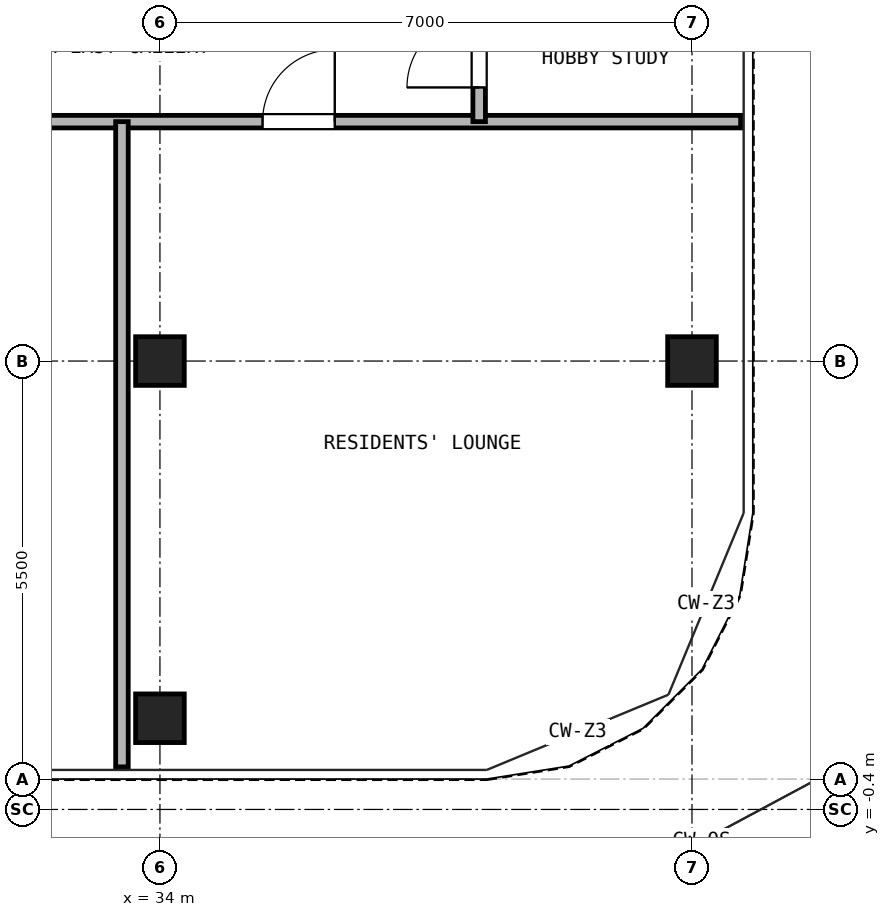
"""IFC4 building model, lengths in metres.
Left out: names, types, materials, properties, quantities, classifications, styles, units other than length and angle.
Written with IfcOpenShell. Run it as: python <this file> out.ifc"""

import sys

from ifc_helpers import new_model, si_unit, direction, frame, frame_2d, origin, origin_2d, place, context, subcontext, project, spatial, rectangle, hollow_rectangle, extrude, source, transform, mapped, element, fill, save


model = new_model("IFC4")
c1 = context("Model", 3, precision=1e-05, world=origin(), true_north=direction((0.0, 1.0)))
c2 = subcontext(c1, "Body", "Model", "MODEL_VIEW")
j1 = project(units=[si_unit("LENGTHUNIT", "METRE"), si_unit("PLANEANGLEUNIT", "RADIAN")], contexts=[c1])
p1 = place(None, origin())
s1 = spatial("IfcSite", under=j1, at=p1, CompositionType="ELEMENT")
p2 = place(p1, origin())
s2 = spatial("IfcBuilding", under=s1, at=p2, CompositionType="ELEMENT")
p3 = place(p2, frame((0.0, 0.0, 229.7)))
s3 = spatial("IfcBuildingStorey", under=s2, at=p3, CompositionType="ELEMENT", Elevation=229.7)
m1 = source(origin(), c2, "Body", "SweptSolid", [
    extrude(hollow_rectangle(XDim=0.64, YDim=0.64, WallThickness=0.035, at=origin_2d()), origin(), (0.0, 0.0, 1.0), 2.98),
])
for number, where, z_axis, x_axis in (
    (1, (34.0, 0.8, 0.0), (0.0, 0.0, 1.0), (1.0, 0.0, 0.0)),
    (2, (41.0, 5.5, 0.0), (0.0, 0.0, 1.0), (1.0, 0.0, 0.0)),
    (3, (34.0, 5.5, 0.0), (0.0, 0.0, 1.0), (1.0, 0.0, 0.0)),
):
    element("IfcColumn", number, at=place(p3, frame(where, z_axis=z_axis, x_axis=x_axis)), inside=s3, PredefinedType="COLUMN", context=c2, shape_type="MappedRepresentation", body=[
        mapped(m1, transform((0.0, 0.0, 0.0), x_axis=(1.0, 0.0, 0.0), y_axis=(0.0, 1.0, 0.0), z_axis=(0.0, 0.0, 1.0), scale=1.0)),
    ])
p4 = place(p3, frame((5.36, 8.65, 0.0), z_axis=(0.0, 0.0, 1.0), x_axis=(1.0, 0.0, 0.0)))
e4 = element("IfcWall", 4, at=p4, inside=s3, PredefinedType="PARTITIONING", context=c2, shape_type="SweptSolid", body=[
    extrude(rectangle(XDim=36.28, YDim=0.165, at=frame_2d((18.14, 0.0))), origin(), (0.0, 0.0, 1.0), 2.655),
])
p5 = place(p4, frame((8.17, 0.0, 0.0)))
e5 = element("IfcOpeningElement", 5, at=p5, cuts=e4, PredefinedType="OPENING", context=c2, shape_type="SweptSolid", body=[
    extrude(rectangle(XDim=0.95, YDim=2.15, at=frame_2d((0.475, 1.075))), frame((0.0, 0.093, 0.0), z_axis=(0.0, -1.0, 0.0), x_axis=(1.0, 0.0, 0.0)), (0.0, 0.0, 1.0), 0.185),
])
p6 = place(p4, frame((18.14, 0.0, 0.0)))
e6 = element("IfcOpeningElement", 6, at=p6, cuts=e4, PredefinedType="OPENING", context=c2, shape_type="SweptSolid", body=[
    extrude(rectangle(XDim=0.95, YDim=2.15, at=frame_2d((0.475, 1.075))), frame((0.0, 0.093, 0.0), z_axis=(0.0, -1.0, 0.0), x_axis=(1.0, 0.0, 0.0)), (0.0, 0.0, 1.0), 0.185),
])
p7 = place(p4, frame((25.14, 0.0, 0.0)))
e7 = element("IfcOpeningElement", 7, at=p7, cuts=e4, PredefinedType="OPENING", context=c2, shape_type="SweptSolid", body=[
    extrude(rectangle(XDim=0.95, YDim=2.15, at=frame_2d((0.475, 1.075))), frame((0.0, 0.093, 0.0), z_axis=(0.0, -1.0, 0.0), x_axis=(1.0, 0.0, 0.0)), (0.0, 0.0, 1.0), 0.185),
])
p8 = place(p4, frame((29.99, 0.0, 0.0)))
e8 = element("IfcOpeningElement", 8, at=p8, cuts=e4, PredefinedType="OPENING", context=c2, shape_type="SweptSolid", body=[
    extrude(rectangle(XDim=0.95, YDim=2.15, at=frame_2d((0.475, 1.075))), frame((0.0, 0.093, 0.0), z_axis=(0.0, -1.0, 0.0), x_axis=(1.0, 0.0, 0.0)), (0.0, 0.0, 1.0), 0.185),
])
p9 = place(p3, frame((38.2, 8.65, 0.0), z_axis=(0.0, 0.0, 1.0), x_axis=(0.0, 1.0, 0.0)))
e9 = element("IfcWall", 9, at=p9, inside=s3, PredefinedType="PARTITIONING", context=c2, shape_type="SweptSolid", body=[
    extrude(rectangle(XDim=2.0, YDim=0.165, at=frame_2d((1.0, 0.0))), origin(), (0.0, 0.0, 1.0), 2.98),
])
p10 = place(p9, frame((0.45, 0.0, 0.0)))
e10 = element("IfcOpeningElement", 10, at=p10, cuts=e9, PredefinedType="OPENING", context=c2, shape_type="SweptSolid", body=[
    extrude(rectangle(XDim=0.95, YDim=2.15, at=frame_2d((0.475, 1.075))), frame((0.0, 0.093, 0.0), z_axis=(0.0, -1.0, 0.0), x_axis=(1.0, 0.0, 0.0)), (0.0, 0.0, 1.0), 0.185),
])
p11 = place(p3, frame((33.5, 0.16, 0.0), z_axis=(0.0, 0.0, 1.0), x_axis=(0.0, 1.0, 0.0)))
e11 = element("IfcWall", 11, at=p11, inside=s3, PredefinedType="PARTITIONING", context=c2, shape_type="SweptSolid", body=[
    extrude(rectangle(XDim=8.49, YDim=0.165, at=frame_2d((4.245, 0.0))), origin(), (0.0, 0.0, 1.0), 2.98),
])
p12 = place(p8, frame((0.95, 0.0, 0.0), z_axis=(0.0, 0.0, 1.0), x_axis=(-1.0, 0.0, 0.0)))
e12 = element("IfcDoor", 12, at=p12, inside=s3, OperationType="SINGLE_SWING_RIGHT", PredefinedType="DOOR", context=c2, shape_type="SweptSolid", body=[
    extrude(rectangle(XDim=0.95, YDim=2.15, at=frame_2d((0.475, 1.075))), frame((0.0, 0.025, 0.0), z_axis=(0.0, -1.0, 0.0), x_axis=(1.0, 0.0, 0.0)), (0.0, 0.0, 1.0), 0.05),
])
fill(e8, e12)
p13 = place(p10, origin())
e13 = element("IfcDoor", 13, at=p13, inside=s3, OperationType="SINGLE_SWING_LEFT", PredefinedType="DOOR", context=c2, shape_type="SweptSolid", body=[
    extrude(rectangle(XDim=0.95, YDim=2.15, at=frame_2d((0.475, 1.075))), frame((0.0, 0.025, 0.0), z_axis=(0.0, -1.0, 0.0), x_axis=(1.0, 0.0, 0.0)), (0.0, 0.0, 1.0), 0.05),
])
fill(e10, e13)
save(model, sys.argv[1])
